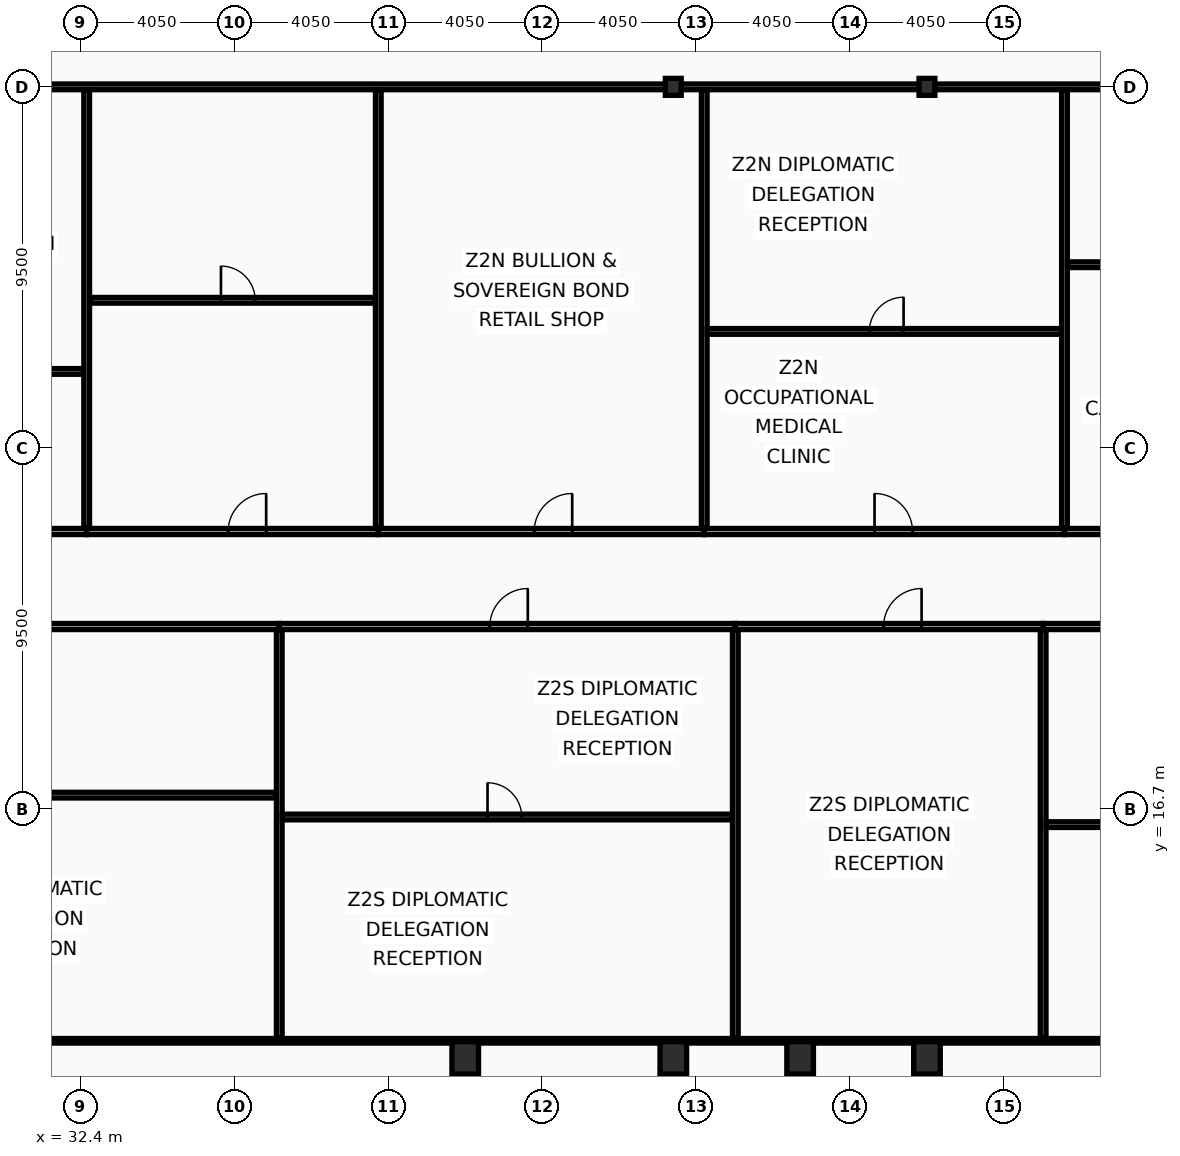
"""IFC4 building model, lengths in metres.
Left out: names, types, materials, properties, quantities, classifications, styles, units other than length and angle.
Written with IfcOpenShell. Run it as: python <this file> out.ifc"""

import sys

from ifc_helpers import new_model, si_unit, direction, frame, frame_2d, origin, origin_2d, place, context, subcontext, project, spatial, rectangle, hollow_rectangle, i_section, extrude, element, fill, save


model = new_model("IFC4")
c1 = context("Model", 3, precision=1e-05, world=origin(), true_north=direction((0.0, 1.0)))
c2 = subcontext(c1, "Body", "Model", "MODEL_VIEW")
j1 = project(units=[si_unit("LENGTHUNIT", "METRE"), si_unit("PLANEANGLEUNIT", "RADIAN")], contexts=[c1])
p1 = place(None, origin())
s1 = spatial("IfcSite", under=j1, at=p1, CompositionType="ELEMENT")
p2 = place(p1, origin())
s2 = spatial("IfcBuilding", under=s1, at=p2, CompositionType="ELEMENT")
p3 = place(p2, frame((0.0, 0.0, 161.4)))
s3 = spatial("IfcBuildingStorey", under=s2, at=p3, CompositionType="ELEMENT", Elevation=161.4)
for number, where, z_axis, x_axis in (
    (1, (42.525, 10.15, 0.0), (0.0, 0.0, 1.0), (1.0, 0.0, 0.0)),
    (2, (48.0, 10.15, 0.0), (0.0, 0.0, 1.0), (1.0, 0.0, 0.0)),
    (3, (51.337, 10.15, 0.0), (0.0, 0.0, 1.0), (1.0, 0.0, 0.0)),
    (4, (54.675, 10.15, 0.0), (0.0, 0.0, 1.0), (1.0, 0.0, 0.0)),
):
    element("IfcColumn", number, at=place(p3, frame(where, z_axis=z_axis, x_axis=x_axis)), inside=s3, PredefinedType="COLUMN", context=c2, shape_type="SweptSolid", body=[
        extrude(hollow_rectangle(XDim=0.7, YDim=0.85, WallThickness=0.05, at=origin_2d()), origin(), (0.0, 0.0, 1.0), 3.6),
    ])
for number, where, z_axis, x_axis in (
    (5, (48.0, 35.7, 0.0), (0.0, 0.0, 1.0), (1.0, 0.0, 0.0)),
    (6, (54.675, 35.7, 0.0), (0.0, 0.0, 1.0), (1.0, 0.0, 0.0)),
):
    element("IfcColumn", number, at=place(p3, frame(where, z_axis=z_axis, x_axis=x_axis)), inside=s3, PredefinedType="COLUMN", context=c2, shape_type="SweptSolid", body=[
        extrude(i_section(OverallWidth=0.416, OverallDepth=0.446, WebThickness=0.039, FlangeThickness=0.063, at=origin_2d()), origin(), (0.0, 0.0, 1.0), 3.6),
    ])
p4 = place(p3, frame((24.093, 21.5, 0.0), z_axis=(0.0, 0.0, 1.0), x_axis=(1.0, 0.0, 0.0)))
e7 = element("IfcWall", 7, at=p4, inside=s3, PredefinedType="PARTITIONING", context=c2, shape_type="SweptSolid", body=[
    extrude(rectangle(XDim=13.538, YDim=0.16, at=frame_2d((6.769, 0.0))), origin(), (0.0, 0.0, 1.0), 2.73),
])
p5 = place(p4, frame((6.186, 0.0, 0.0)))
e8 = element("IfcOpeningElement", 8, at=p5, cuts=e7, PredefinedType="OPENING", context=c2, shape_type="SweptSolid", body=[
    extrude(rectangle(XDim=1.0, YDim=2.05, at=frame_2d((0.5, 1.025))), frame((0.0, 0.09, 0.0), z_axis=(0.0, -1.0, 0.0), x_axis=(1.0, 0.0, 0.0)), (0.0, 0.0, 1.0), 0.18),
])
p6 = place(p3, frame((24.173, 17.063, 0.0), z_axis=(0.0, 0.0, 1.0), x_axis=(1.0, 0.0, 0.0)))
e9 = element("IfcWall", 9, at=p6, inside=s3, PredefinedType="PARTITIONING", context=c2, shape_type="SweptSolid", body=[
    extrude(rectangle(XDim=13.378, YDim=0.15, at=frame_2d((6.689, 0.0))), origin(), (0.0, 0.0, 1.0), 2.73),
])
p7 = place(p6, frame((6.092, 0.0, 0.0)))
e10 = element("IfcOpeningElement", 10, at=p7, cuts=e9, PredefinedType="OPENING", context=c2, shape_type="SweptSolid", body=[
    extrude(rectangle(XDim=0.9, YDim=2.05, at=frame_2d((0.45, 1.025))), frame((0.0, 0.085, 0.0), z_axis=(0.0, -1.0, 0.0), x_axis=(1.0, 0.0, 0.0)), (0.0, 0.0, 1.0), 0.17),
])
p8 = place(p3, frame((37.631, 21.5, 0.0), z_axis=(0.0, 0.0, 1.0), x_axis=(1.0, 0.0, 0.0)))
e11 = element("IfcWall", 11, at=p8, inside=s3, PredefinedType="PARTITIONING", context=c2, shape_type="SweptSolid", body=[
    extrude(rectangle(XDim=12.0, YDim=0.16, at=frame_2d((6.0, 0.0))), origin(), (0.0, 0.0, 1.0), 2.73),
])
p9 = place(p8, frame((5.54, 0.0, 0.0)))
e12 = element("IfcOpeningElement", 12, at=p9, cuts=e11, PredefinedType="OPENING", context=c2, shape_type="SweptSolid", body=[
    extrude(rectangle(XDim=1.0, YDim=2.05, at=frame_2d((0.5, 1.025))), frame((0.0, 0.09, 0.0), z_axis=(0.0, -1.0, 0.0), x_axis=(1.0, 0.0, 0.0)), (0.0, 0.0, 1.0), 0.18),
])
p10 = place(p3, frame((37.631, 10.665, 0.0), z_axis=(0.0, 0.0, 1.0), x_axis=(0.0, 1.0, 0.0)))
e13 = element("IfcWall", 13, at=p10, inside=s3, PredefinedType="PARTITIONING", context=c2, shape_type="SweptSolid", body=[
    extrude(rectangle(XDim=10.75, YDim=0.15, at=frame_2d((5.375, 0.0))), origin(), (0.0, 0.0, 1.0), 2.93),
])
p11 = place(p3, frame((37.711, 16.488, 0.0), z_axis=(0.0, 0.0, 1.0), x_axis=(1.0, 0.0, 0.0)))
e14 = element("IfcWall", 14, at=p11, inside=s3, PredefinedType="PARTITIONING", context=c2, shape_type="SweptSolid", body=[
    extrude(rectangle(XDim=11.841, YDim=0.15, at=frame_2d((5.92, 0.0))), origin(), (0.0, 0.0, 1.0), 2.73),
])
p12 = place(p11, frame((5.4, 0.0, 0.0)))
e15 = element("IfcOpeningElement", 15, at=p12, cuts=e14, PredefinedType="OPENING", context=c2, shape_type="SweptSolid", body=[
    extrude(rectangle(XDim=0.9, YDim=2.05, at=frame_2d((0.45, 1.025))), frame((0.0, 0.085, 0.0), z_axis=(0.0, -1.0, 0.0), x_axis=(1.0, 0.0, 0.0)), (0.0, 0.0, 1.0), 0.17),
])
p13 = place(p3, frame((49.632, 21.5, 0.0), z_axis=(0.0, 0.0, 1.0), x_axis=(1.0, 0.0, 0.0)))
e16 = element("IfcWall", 16, at=p13, inside=s3, PredefinedType="PARTITIONING", context=c2, shape_type="SweptSolid", body=[
    extrude(rectangle(XDim=8.1, YDim=0.16, at=frame_2d((4.05, 0.0))), origin(), (0.0, 0.0, 1.0), 2.73),
])
p14 = place(p13, frame((3.902, 0.0, 0.0)))
e17 = element("IfcOpeningElement", 17, at=p14, cuts=e16, PredefinedType="OPENING", context=c2, shape_type="SweptSolid", body=[
    extrude(rectangle(XDim=1.0, YDim=2.05, at=frame_2d((0.5, 1.025))), frame((0.0, 0.09, 0.0), z_axis=(0.0, -1.0, 0.0), x_axis=(1.0, 0.0, 0.0)), (0.0, 0.0, 1.0), 0.18),
])
p15 = place(p3, frame((49.632, 10.665, 0.0), z_axis=(0.0, 0.0, 1.0), x_axis=(0.0, 1.0, 0.0)))
e18 = element("IfcWall", 18, at=p15, inside=s3, PredefinedType="PARTITIONING", context=c2, shape_type="SweptSolid", body=[
    extrude(rectangle(XDim=10.75, YDim=0.15, at=frame_2d((5.375, 0.0))), origin(), (0.0, 0.0, 1.0), 2.93),
])
p16 = place(p3, frame((57.732, 21.5, 0.0), z_axis=(0.0, 0.0, 1.0), x_axis=(1.0, 0.0, 0.0)))
e19 = element("IfcWall", 19, at=p16, inside=s3, PredefinedType="PARTITIONING", context=c2, shape_type="SweptSolid", body=[
    extrude(rectangle(XDim=9.138, YDim=0.16, at=frame_2d((4.569, 0.0))), origin(), (0.0, 0.0, 1.0), 3.44),
])
p17 = place(p16, frame((4.338, 0.0, 0.0)))
e20 = element("IfcOpeningElement", 20, at=p17, cuts=e19, PredefinedType="OPENING", context=c2, shape_type="SweptSolid", body=[
    extrude(rectangle(XDim=1.0, YDim=2.05, at=frame_2d((0.5, 1.025))), frame((0.0, 0.09, 0.0), z_axis=(0.0, -1.0, 0.0), x_axis=(1.0, 0.0, 0.0)), (0.0, 0.0, 1.0), 0.18),
])
p18 = place(p3, frame((57.732, 10.665, 0.0), z_axis=(0.0, 0.0, 1.0), x_axis=(0.0, 1.0, 0.0)))
e21 = element("IfcWall", 21, at=p18, inside=s3, PredefinedType="PARTITIONING", context=c2, shape_type="SweptSolid", body=[
    extrude(rectangle(XDim=10.75, YDim=0.15, at=frame_2d((5.375, 0.0))), origin(), (0.0, 0.0, 1.0), 2.73),
])
p19 = place(p3, frame((57.812, 16.288, 0.0), z_axis=(0.0, 0.0, 1.0), x_axis=(1.0, 0.0, 0.0)))
e22 = element("IfcWall", 22, at=p19, inside=s3, PredefinedType="PARTITIONING", context=c2, shape_type="SweptSolid", body=[
    extrude(rectangle(XDim=8.993, YDim=0.15, at=frame_2d((4.497, 0.0))), origin(), (0.0, 0.0, 1.0), 2.83),
])
p20 = place(p19, frame((4.112, 0.0, 0.0)))
e23 = element("IfcOpeningElement", 23, at=p20, cuts=e22, PredefinedType="OPENING", context=c2, shape_type="SweptSolid", body=[
    extrude(rectangle(XDim=0.9, YDim=2.05, at=frame_2d((0.45, 1.025))), frame((0.0, 0.085, 0.0), z_axis=(0.0, -1.0, 0.0), x_axis=(1.0, 0.0, 0.0)), (0.0, 0.0, 1.0), 0.17),
])
p21 = place(p3, frame((21.81, 35.7, 0.0), z_axis=(0.0, 0.0, 1.0), x_axis=(1.0, 0.0, 0.0)))
e24 = element("IfcWall", 24, at=p21, inside=s3, PredefinedType="PARTITIONING", context=c2, shape_type="SweptSolid", body=[
    extrude(rectangle(XDim=44.995, YDim=0.15, at=frame_2d((22.498, 0.0))), origin(), (0.0, 0.0, 1.0), 2.73),
])
p22 = place(p3, frame((21.73, 24.0, 0.0), z_axis=(0.0, 0.0, 1.0), x_axis=(1.0, 0.0, 0.0)))
e25 = element("IfcWall", 25, at=p22, inside=s3, PredefinedType="PARTITIONING", context=c2, shape_type="SweptSolid", body=[
    extrude(rectangle(XDim=10.834, YDim=0.16, at=frame_2d((5.417, 0.0))), origin(), (0.0, 0.0, 1.0), 2.73),
])
p23 = place(p22, frame((5.05, 0.0, 0.0)))
e26 = element("IfcOpeningElement", 26, at=p23, cuts=e25, PredefinedType="OPENING", context=c2, shape_type="SweptSolid", body=[
    extrude(rectangle(XDim=1.0, YDim=2.05, at=frame_2d((0.5, 1.025))), frame((0.0, 0.09, 0.0), z_axis=(0.0, -1.0, 0.0), x_axis=(1.0, 0.0, 0.0)), (0.0, 0.0, 1.0), 0.18),
])
p24 = place(p3, frame((21.81, 28.212, 0.0), z_axis=(0.0, 0.0, 1.0), x_axis=(1.0, 0.0, 0.0)))
e27 = element("IfcWall", 27, at=p24, inside=s3, PredefinedType="PARTITIONING", context=c2, shape_type="SweptSolid", body=[
    extrude(rectangle(XDim=10.674, YDim=0.15, at=frame_2d((5.337, 0.0))), origin(), (0.0, 0.0, 1.0), 2.73),
])
p25 = place(p24, frame((4.875, 0.0, 0.0)))
e28 = element("IfcOpeningElement", 28, at=p25, cuts=e27, PredefinedType="OPENING", context=c2, shape_type="SweptSolid", body=[
    extrude(rectangle(XDim=0.9, YDim=2.05, at=frame_2d((0.45, 1.025))), frame((0.0, 0.085, 0.0), z_axis=(0.0, -1.0, 0.0), x_axis=(1.0, 0.0, 0.0)), (0.0, 0.0, 1.0), 0.17),
])
p26 = place(p3, frame((32.564, 24.0, 0.0), z_axis=(0.0, 0.0, 1.0), x_axis=(1.0, 0.0, 0.0)))
e29 = element("IfcWall", 29, at=p26, inside=s3, PredefinedType="PARTITIONING", context=c2, shape_type="SweptSolid", body=[
    extrude(rectangle(XDim=7.674, YDim=0.16, at=frame_2d((3.837, 0.0))), origin(), (0.0, 0.0, 1.0), 3.44),
])
p27 = place(p26, frame((3.723, 0.0, 0.0)))
e30 = element("IfcOpeningElement", 30, at=p27, cuts=e29, PredefinedType="OPENING", context=c2, shape_type="SweptSolid", body=[
    extrude(rectangle(XDim=1.0, YDim=2.05, at=frame_2d((0.5, 1.025))), frame((0.0, 0.09, 0.0), z_axis=(0.0, -1.0, 0.0), x_axis=(1.0, 0.0, 0.0)), (0.0, 0.0, 1.0), 0.18),
])
p28 = place(p3, frame((32.564, 24.085, 0.0), z_axis=(0.0, 0.0, 1.0), x_axis=(0.0, 1.0, 0.0)))
e31 = element("IfcWall", 31, at=p28, inside=s3, PredefinedType="PARTITIONING", context=c2, shape_type="SweptSolid", body=[
    extrude(rectangle(XDim=11.535, YDim=0.15, at=frame_2d((5.768, 0.0))), origin(), (0.0, 0.0, 1.0), 2.93),
])
p29 = place(p3, frame((32.644, 30.084, 0.0), z_axis=(0.0, 0.0, 1.0), x_axis=(1.0, 0.0, 0.0)))
e32 = element("IfcWall", 32, at=p29, inside=s3, PredefinedType="PARTITIONING", context=c2, shape_type="SweptSolid", body=[
    extrude(rectangle(XDim=7.514, YDim=0.15, at=frame_2d((3.757, 0.0))), origin(), (0.0, 0.0, 1.0), 3.44),
])
p30 = place(p29, frame((3.453, 0.0, 0.0)))
e33 = element("IfcOpeningElement", 33, at=p30, cuts=e32, PredefinedType="OPENING", context=c2, shape_type="SweptSolid", body=[
    extrude(rectangle(XDim=0.9, YDim=2.05, at=frame_2d((0.45, 1.025))), frame((0.0, 0.085, 0.0), z_axis=(0.0, -1.0, 0.0), x_axis=(1.0, 0.0, 0.0)), (0.0, 0.0, 1.0), 0.17),
])
p31 = place(p3, frame((40.237, 24.0, 0.0), z_axis=(0.0, 0.0, 1.0), x_axis=(1.0, 0.0, 0.0)))
e34 = element("IfcWall", 34, at=p31, inside=s3, PredefinedType="PARTITIONING", context=c2, shape_type="SweptSolid", body=[
    extrude(rectangle(XDim=8.577, YDim=0.16, at=frame_2d((4.288, 0.0))), origin(), (0.0, 0.0, 1.0), 2.73),
])
p32 = place(p31, frame((4.102, 0.0, 0.0)))
e35 = element("IfcOpeningElement", 35, at=p32, cuts=e34, PredefinedType="OPENING", context=c2, shape_type="SweptSolid", body=[
    extrude(rectangle(XDim=1.0, YDim=2.05, at=frame_2d((0.5, 1.025))), frame((0.0, 0.09, 0.0), z_axis=(0.0, -1.0, 0.0), x_axis=(1.0, 0.0, 0.0)), (0.0, 0.0, 1.0), 0.18),
])
p33 = place(p3, frame((40.237, 24.085, 0.0), z_axis=(0.0, 0.0, 1.0), x_axis=(0.0, 1.0, 0.0)))
e36 = element("IfcWall", 36, at=p33, inside=s3, PredefinedType="PARTITIONING", context=c2, shape_type="SweptSolid", body=[
    extrude(rectangle(XDim=11.535, YDim=0.15, at=frame_2d((5.768, 0.0))), origin(), (0.0, 0.0, 1.0), 2.93),
])
p34 = place(p3, frame((48.814, 24.0, 0.0), z_axis=(0.0, 0.0, 1.0), x_axis=(1.0, 0.0, 0.0)))
e37 = element("IfcWall", 37, at=p34, inside=s3, PredefinedType="PARTITIONING", context=c2, shape_type="SweptSolid", body=[
    extrude(rectangle(XDim=9.479, YDim=0.16, at=frame_2d((4.74, 0.0))), origin(), (0.0, 0.0, 1.0), 2.73),
])
p35 = place(p34, frame((4.481, 0.0, 0.0)))
e38 = element("IfcOpeningElement", 38, at=p35, cuts=e37, PredefinedType="OPENING", context=c2, shape_type="SweptSolid", body=[
    extrude(rectangle(XDim=1.0, YDim=2.05, at=frame_2d((0.5, 1.025))), frame((0.0, 0.09, 0.0), z_axis=(0.0, -1.0, 0.0), x_axis=(1.0, 0.0, 0.0)), (0.0, 0.0, 1.0), 0.18),
])
p36 = place(p3, frame((48.814, 24.085, 0.0), z_axis=(0.0, 0.0, 1.0), x_axis=(0.0, 1.0, 0.0)))
e39 = element("IfcWall", 39, at=p36, inside=s3, PredefinedType="PARTITIONING", context=c2, shape_type="SweptSolid", body=[
    extrude(rectangle(XDim=11.535, YDim=0.15, at=frame_2d((5.768, 0.0))), origin(), (0.0, 0.0, 1.0), 2.93),
])
p37 = place(p3, frame((48.894, 29.265, 0.0), z_axis=(0.0, 0.0, 1.0), x_axis=(1.0, 0.0, 0.0)))
e40 = element("IfcWall", 40, at=p37, inside=s3, PredefinedType="PARTITIONING", context=c2, shape_type="SweptSolid", body=[
    extrude(rectangle(XDim=9.319, YDim=0.15, at=frame_2d((4.66, 0.0))), origin(), (0.0, 0.0, 1.0), 2.73),
])
p38 = place(p37, frame((4.266, 0.0, 0.0)))
e41 = element("IfcOpeningElement", 41, at=p38, cuts=e40, PredefinedType="OPENING", context=c2, shape_type="SweptSolid", body=[
    extrude(rectangle(XDim=0.9, YDim=2.05, at=frame_2d((0.45, 1.025))), frame((0.0, 0.085, 0.0), z_axis=(0.0, -1.0, 0.0), x_axis=(1.0, 0.0, 0.0)), (0.0, 0.0, 1.0), 0.17),
])
p39 = place(p3, frame((58.293, 24.0, 0.0), z_axis=(0.0, 0.0, 1.0), x_axis=(1.0, 0.0, 0.0)))
e42 = element("IfcWall", 42, at=p39, inside=s3, PredefinedType="PARTITIONING", context=c2, shape_type="SweptSolid", body=[
    extrude(rectangle(XDim=8.577, YDim=0.16, at=frame_2d((4.288, 0.0))), origin(), (0.0, 0.0, 1.0), 3.44),
])
p40 = place(p39, frame((4.102, 0.0, 0.0)))
e43 = element("IfcOpeningElement", 43, at=p40, cuts=e42, PredefinedType="OPENING", context=c2, shape_type="SweptSolid", body=[
    extrude(rectangle(XDim=1.0, YDim=2.05, at=frame_2d((0.5, 1.025))), frame((0.0, 0.09, 0.0), z_axis=(0.0, -1.0, 0.0), x_axis=(1.0, 0.0, 0.0)), (0.0, 0.0, 1.0), 0.18),
])
p41 = place(p3, frame((58.293, 24.085, 0.0), z_axis=(0.0, 0.0, 1.0), x_axis=(0.0, 1.0, 0.0)))
e44 = element("IfcWall", 44, at=p41, inside=s3, PredefinedType="PARTITIONING", context=c2, shape_type="SweptSolid", body=[
    extrude(rectangle(XDim=11.535, YDim=0.15, at=frame_2d((5.768, 0.0))), origin(), (0.0, 0.0, 1.0), 2.73),
])
p42 = place(p3, frame((58.373, 31.02, 0.0), z_axis=(0.0, 0.0, 1.0), x_axis=(1.0, 0.0, 0.0)))
e45 = element("IfcWall", 45, at=p42, inside=s3, PredefinedType="PARTITIONING", context=c2, shape_type="SweptSolid", body=[
    extrude(rectangle(XDim=8.432, YDim=0.15, at=frame_2d((4.216, 0.0))), origin(), (0.0, 0.0, 1.0), 2.73),
])
p43 = place(p42, frame((3.86, 0.0, 0.0)))
e46 = element("IfcOpeningElement", 46, at=p43, cuts=e45, PredefinedType="OPENING", context=c2, shape_type="SweptSolid", body=[
    extrude(rectangle(XDim=0.9, YDim=2.05, at=frame_2d((0.45, 1.025))), frame((0.0, 0.085, 0.0), z_axis=(0.0, -1.0, 0.0), x_axis=(1.0, 0.0, 0.0)), (0.0, 0.0, 1.0), 0.17),
])
p44 = place(p3, frame((6.095, 10.6, 0.0), z_axis=(0.0, 0.0, 1.0), x_axis=(1.0, 0.0, 0.0)))
e47 = element("IfcWall", 47, at=p44, inside=s3, PredefinedType="PARTITIONING", context=c2, shape_type="SweptSolid", body=[
    extrude(rectangle(XDim=60.71, YDim=0.12, at=frame_2d((30.355, 0.0))), origin(), (0.0, 0.0, 1.0), 2.73),
])
p45 = place(p9, origin())
e48 = element("IfcDoor", 48, at=p45, inside=s3, OperationType="SINGLE_SWING_RIGHT", PredefinedType="DOOR", context=c2, shape_type="SweptSolid", body=[
    extrude(rectangle(XDim=1.0, YDim=2.05, at=frame_2d((0.5, 1.025))), frame((0.0, 0.025, 0.0), z_axis=(0.0, -1.0, 0.0), x_axis=(1.0, 0.0, 0.0)), (0.0, 0.0, 1.0), 0.05),
])
fill(e12, e48)
p46 = place(p12, origin())
e49 = element("IfcDoor", 49, at=p46, inside=s3, OperationType="SINGLE_SWING_LEFT", PredefinedType="DOOR", context=c2, shape_type="SweptSolid", body=[
    extrude(rectangle(XDim=0.9, YDim=2.05, at=frame_2d((0.45, 1.025))), frame((0.0, 0.025, 0.0), z_axis=(0.0, -1.0, 0.0), x_axis=(1.0, 0.0, 0.0)), (0.0, 0.0, 1.0), 0.05),
])
fill(e15, e49)
p47 = place(p14, origin())
e50 = element("IfcDoor", 50, at=p47, inside=s3, OperationType="SINGLE_SWING_RIGHT", PredefinedType="DOOR", context=c2, shape_type="SweptSolid", body=[
    extrude(rectangle(XDim=1.0, YDim=2.05, at=frame_2d((0.5, 1.025))), frame((0.0, 0.025, 0.0), z_axis=(0.0, -1.0, 0.0), x_axis=(1.0, 0.0, 0.0)), (0.0, 0.0, 1.0), 0.05),
])
fill(e17, e50)
p48 = place(p27, origin())
e51 = element("IfcDoor", 51, at=p48, inside=s3, OperationType="SINGLE_SWING_RIGHT", PredefinedType="DOOR", context=c2, shape_type="SweptSolid", body=[
    extrude(rectangle(XDim=1.0, YDim=2.05, at=frame_2d((0.5, 1.025))), frame((0.0, 0.025, 0.0), z_axis=(0.0, -1.0, 0.0), x_axis=(1.0, 0.0, 0.0)), (0.0, 0.0, 1.0), 0.05),
])
fill(e30, e51)
p49 = place(p30, origin())
e52 = element("IfcDoor", 52, at=p49, inside=s3, OperationType="SINGLE_SWING_LEFT", PredefinedType="DOOR", context=c2, shape_type="SweptSolid", body=[
    extrude(rectangle(XDim=0.9, YDim=2.05, at=frame_2d((0.45, 1.025))), frame((0.0, 0.025, 0.0), z_axis=(0.0, -1.0, 0.0), x_axis=(1.0, 0.0, 0.0)), (0.0, 0.0, 1.0), 0.05),
])
fill(e33, e52)
p50 = place(p32, origin())
e53 = element("IfcDoor", 53, at=p50, inside=s3, OperationType="SINGLE_SWING_RIGHT", PredefinedType="DOOR", context=c2, shape_type="SweptSolid", body=[
    extrude(rectangle(XDim=1.0, YDim=2.05, at=frame_2d((0.5, 1.025))), frame((0.0, 0.025, 0.0), z_axis=(0.0, -1.0, 0.0), x_axis=(1.0, 0.0, 0.0)), (0.0, 0.0, 1.0), 0.05),
])
fill(e35, e53)
p51 = place(p35, origin())
e54 = element("IfcDoor", 54, at=p51, inside=s3, OperationType="SINGLE_SWING_LEFT", PredefinedType="DOOR", context=c2, shape_type="SweptSolid", body=[
    extrude(rectangle(XDim=1.0, YDim=2.05, at=frame_2d((0.5, 1.025))), frame((0.0, 0.025, 0.0), z_axis=(0.0, -1.0, 0.0), x_axis=(1.0, 0.0, 0.0)), (0.0, 0.0, 1.0), 0.05),
])
fill(e38, e54)
p52 = place(p38, origin())
e55 = element("IfcDoor", 55, at=p52, inside=s3, OperationType="SINGLE_SWING_RIGHT", PredefinedType="DOOR", context=c2, shape_type="SweptSolid", body=[
    extrude(rectangle(XDim=0.9, YDim=2.05, at=frame_2d((0.45, 1.025))), frame((0.0, 0.025, 0.0), z_axis=(0.0, -1.0, 0.0), x_axis=(1.0, 0.0, 0.0)), (0.0, 0.0, 1.0), 0.05),
])
fill(e41, e55)
save(model, sys.argv[1])
